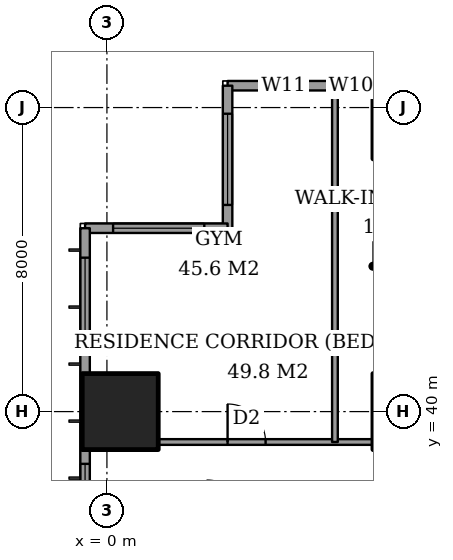
"""IFC4 building model, lengths in metres.
Left out: names, types, materials, properties, quantities, classifications, styles, units other than length and angle.
Written with IfcOpenShell. Run it as: python <this file> out.ifc"""

import sys

from ifc_helpers import new_model, si_unit, direction, frame, frame_2d, origin, origin_2d, place, context, subcontext, project, spatial, rectangle, extrude, element, fill, save


model = new_model("IFC4")
c1 = context("Model", 3, precision=1e-05, world=origin(), true_north=direction((0.0, 1.0)))
c2 = subcontext(c1, "Body", "Model", "MODEL_VIEW")
j1 = project(units=[si_unit("LENGTHUNIT", "METRE"), si_unit("PLANEANGLEUNIT", "RADIAN")], contexts=[c1])
p1 = place(None, origin())
s1 = spatial("IfcSite", under=j1, at=p1, CompositionType="ELEMENT")
p2 = place(p1, origin())
s2 = spatial("IfcBuilding", under=s1, at=p2, CompositionType="ELEMENT")
p3 = place(p2, frame((0.0, 0.0, 128.6)))
s3 = spatial("IfcBuildingStorey", under=s2, at=p3, CompositionType="ELEMENT", Elevation=128.6)
p4 = place(p3, frame((0.35, 40.0, 0.0), z_axis=(0.0, 0.0, 1.0), x_axis=(1.0, 0.0, 0.0)))
e1 = element("IfcColumn", 1, at=p4, inside=s3, PredefinedType="COLUMN", context=c2, shape_type="SweptSolid", body=[
    extrude(rectangle(XDim=2.0, YDim=2.0, at=origin_2d()), origin(), (0.0, 0.0, 1.0), 3.6),
])
p5 = place(p3, frame((24.575, 48.575, 0.0), z_axis=(0.0, 0.0, 1.0), x_axis=(-1.0, 0.0, 0.0)))
e2 = element("IfcWall", 2, at=p5, inside=s3, PredefinedType="SOLIDWALL", context=c2, shape_type="SweptSolid", body=[
    extrude(rectangle(XDim=21.4, YDim=0.25, at=frame_2d((10.7, 0.0))), origin(), (0.0, 0.0, 1.0), 3.6),
])
p6 = place(p5, frame((2.275, 0.0, 0.4)))
e3 = element("IfcOpeningElement", 3, at=p6, cuts=e2, PredefinedType="OPENING", context=c2, shape_type="SweptSolid", body=[
    extrude(rectangle(XDim=1.2, YDim=2.2, at=frame_2d((0.6, 1.1))), frame((0.0, 0.135, 0.0), z_axis=(0.0, -1.0, 0.0), x_axis=(1.0, 0.0, 0.0)), (0.0, 0.0, 1.0), 0.27),
])
p7 = place(p5, frame((4.425, 0.0, 0.4)))
e4 = element("IfcOpeningElement", 4, at=p7, cuts=e2, PredefinedType="OPENING", context=c2, shape_type="SweptSolid", body=[
    extrude(rectangle(XDim=2.4, YDim=2.2, at=frame_2d((1.2, 1.1))), frame((0.0, 0.135, 0.0), z_axis=(0.0, -1.0, 0.0), x_axis=(1.0, 0.0, 0.0)), (0.0, 0.0, 1.0), 0.27),
])
p8 = place(p5, frame((10.4, 0.0, 0.4)))
e5 = element("IfcOpeningElement", 5, at=p8, cuts=e2, PredefinedType="OPENING", context=c2, shape_type="SweptSolid", body=[
    extrude(rectangle(XDim=1.2, YDim=2.2, at=frame_2d((0.6, 1.1))), frame((0.0, 0.135, 0.0), z_axis=(0.0, -1.0, 0.0), x_axis=(1.0, 0.0, 0.0)), (0.0, 0.0, 1.0), 0.27),
])
p9 = place(p5, frame((12.475, 0.0, 0.4)))
e6 = element("IfcOpeningElement", 6, at=p9, cuts=e2, PredefinedType="OPENING", context=c2, shape_type="SweptSolid", body=[
    extrude(rectangle(XDim=2.4, YDim=2.2, at=frame_2d((1.2, 1.1))), frame((0.0, 0.135, 0.0), z_axis=(0.0, -1.0, 0.0), x_axis=(1.0, 0.0, 0.0)), (0.0, 0.0, 1.0), 0.27),
])
p10 = place(p5, frame((17.85, 0.0, 0.4)))
e7 = element("IfcOpeningElement", 7, at=p10, cuts=e2, PredefinedType="OPENING", context=c2, shape_type="SweptSolid", body=[
    extrude(rectangle(XDim=0.6, YDim=2.2, at=frame_2d((0.3, 1.1))), frame((0.0, 0.135, 0.0), z_axis=(0.0, -1.0, 0.0), x_axis=(1.0, 0.0, 0.0)), (0.0, 0.0, 1.0), 0.27),
])
p11 = place(p5, frame((19.325, 0.0, 0.4)))
e8 = element("IfcOpeningElement", 8, at=p11, cuts=e2, PredefinedType="OPENING", context=c2, shape_type="SweptSolid", body=[
    extrude(rectangle(XDim=1.2, YDim=2.2, at=frame_2d((0.6, 1.1))), frame((0.0, 0.135, 0.0), z_axis=(0.0, -1.0, 0.0), x_axis=(1.0, 0.0, 0.0)), (0.0, 0.0, 1.0), 0.27),
])
p12 = place(p3, frame((3.175, 48.575, 0.0), z_axis=(0.0, 0.0, 1.0), x_axis=(0.0, -1.0, 0.0)))
e9 = element("IfcWall", 9, at=p12, inside=s3, PredefinedType="SOLIDWALL", context=c2, shape_type="SweptSolid", body=[
    extrude(rectangle(XDim=3.75, YDim=0.25, at=frame_2d((1.875, 0.0))), origin(), (0.0, 0.0, 1.0), 3.6),
])
p13 = place(p12, frame((0.738, 0.0, 0.4)))
e10 = element("IfcOpeningElement", 10, at=p13, cuts=e9, PredefinedType="OPENING", context=c2, shape_type="SweptSolid", body=[
    extrude(rectangle(XDim=2.4, YDim=2.2, at=frame_2d((1.2, 1.1))), frame((0.0, 0.135, 0.0), z_axis=(0.0, -1.0, 0.0), x_axis=(1.0, 0.0, 0.0)), (0.0, 0.0, 1.0), 0.27),
])
p14 = place(p3, frame((3.175, 44.825, 0.0), z_axis=(0.0, 0.0, 1.0), x_axis=(-1.0, 0.0, 0.0)))
e11 = element("IfcWall", 11, at=p14, inside=s3, PredefinedType="SOLIDWALL", context=c2, shape_type="SweptSolid", body=[
    extrude(rectangle(XDim=3.75, YDim=0.25, at=frame_2d((1.875, 0.0))), origin(), (0.0, 0.0, 1.0), 3.6),
])
p15 = place(p14, frame((0.613, 0.0, 0.4)))
e12 = element("IfcOpeningElement", 12, at=p15, cuts=e11, PredefinedType="OPENING", context=c2, shape_type="SweptSolid", body=[
    extrude(rectangle(XDim=2.4, YDim=2.2, at=frame_2d((1.2, 1.1))), frame((0.0, 0.135, 0.0), z_axis=(0.0, -1.0, 0.0), x_axis=(1.0, 0.0, 0.0)), (0.0, 0.0, 1.0), 0.27),
])
p16 = place(p3, frame((-0.575, 44.825, 0.0), z_axis=(0.0, 0.0, 1.0), x_axis=(0.0, -1.0, 0.0)))
e13 = element("IfcWall", 13, at=p16, inside=s3, PredefinedType="SOLIDWALL", context=c2, shape_type="SweptSolid", body=[
    extrude(rectangle(XDim=41.65, YDim=0.25, at=frame_2d((20.825, 0.0))), origin(), (0.0, 0.0, 1.0), 3.6),
])
p17 = place(p16, frame((0.775, 0.0, 0.4)))
e14 = element("IfcOpeningElement", 14, at=p17, cuts=e13, PredefinedType="OPENING", context=c2, shape_type="SweptSolid", body=[
    extrude(rectangle(XDim=2.4, YDim=2.2, at=frame_2d((1.2, 1.1))), frame((0.0, 0.135, 0.0), z_axis=(0.0, -1.0, 0.0), x_axis=(1.0, 0.0, 0.0)), (0.0, 0.0, 1.0), 0.27),
])
p18 = place(p16, frame((6.2, 0.0, 0.4)))
e15 = element("IfcOpeningElement", 15, at=p18, cuts=e13, PredefinedType="OPENING", context=c2, shape_type="SweptSolid", body=[
    extrude(rectangle(XDim=1.2, YDim=2.2, at=frame_2d((0.6, 1.1))), frame((0.0, 0.135, 0.0), z_axis=(0.0, -1.0, 0.0), x_axis=(1.0, 0.0, 0.0)), (0.0, 0.0, 1.0), 0.27),
])
p19 = place(p16, frame((8.525, 0.0, 0.4)))
e16 = element("IfcOpeningElement", 16, at=p19, cuts=e13, PredefinedType="OPENING", context=c2, shape_type="SweptSolid", body=[
    extrude(rectangle(XDim=2.4, YDim=2.2, at=frame_2d((1.2, 1.1))), frame((0.0, 0.135, 0.0), z_axis=(0.0, -1.0, 0.0), x_axis=(1.0, 0.0, 0.0)), (0.0, 0.0, 1.0), 0.27),
])
p20 = place(p16, frame((15.625, 0.0, 0.4)))
e17 = element("IfcOpeningElement", 17, at=p20, cuts=e13, PredefinedType="OPENING", context=c2, shape_type="SweptSolid", body=[
    extrude(rectangle(XDim=2.4, YDim=2.2, at=frame_2d((1.2, 1.1))), frame((0.0, 0.135, 0.0), z_axis=(0.0, -1.0, 0.0), x_axis=(1.0, 0.0, 0.0)), (0.0, 0.0, 1.0), 0.27),
])
p21 = place(p16, frame((23.625, 0.0, 0.4)))
e18 = element("IfcOpeningElement", 18, at=p21, cuts=e13, PredefinedType="OPENING", context=c2, shape_type="SweptSolid", body=[
    extrude(rectangle(XDim=2.4, YDim=2.2, at=frame_2d((1.2, 1.1))), frame((0.0, 0.135, 0.0), z_axis=(0.0, -1.0, 0.0), x_axis=(1.0, 0.0, 0.0)), (0.0, 0.0, 1.0), 0.27),
])
p22 = place(p16, frame((30.825, 0.0, 0.4)))
e19 = element("IfcOpeningElement", 19, at=p22, cuts=e13, PredefinedType="OPENING", context=c2, shape_type="SweptSolid", body=[
    extrude(rectangle(XDim=2.4, YDim=2.2, at=frame_2d((1.2, 1.1))), frame((0.0, 0.135, 0.0), z_axis=(0.0, -1.0, 0.0), x_axis=(1.0, 0.0, 0.0)), (0.0, 0.0, 1.0), 0.27),
])
p23 = place(p16, frame((34.5, 0.0, 0.4)))
e20 = element("IfcOpeningElement", 20, at=p23, cuts=e13, PredefinedType="OPENING", context=c2, shape_type="SweptSolid", body=[
    extrude(rectangle(XDim=1.2, YDim=2.2, at=frame_2d((0.6, 1.1))), frame((0.0, 0.135, 0.0), z_axis=(0.0, -1.0, 0.0), x_axis=(1.0, 0.0, 0.0)), (0.0, 0.0, 1.0), 0.27),
])
p24 = place(p16, frame((38.475, 0.0, 0.4)))
e21 = element("IfcOpeningElement", 21, at=p24, cuts=e13, PredefinedType="OPENING", context=c2, shape_type="SweptSolid", body=[
    extrude(rectangle(XDim=2.4, YDim=2.2, at=frame_2d((1.2, 1.1))), frame((0.0, 0.135, 0.0), z_axis=(0.0, -1.0, 0.0), x_axis=(1.0, 0.0, 0.0)), (0.0, 0.0, 1.0), 0.27),
])
p25 = place(p3, frame((1.35, 39.2, 0.0), z_axis=(0.0, 0.0, 1.0), x_axis=(1.0, 0.0, 0.0)))
e22 = element("IfcWall", 22, at=p25, inside=s3, PredefinedType="PARTITIONING", context=c2, shape_type="SweptSolid", body=[
    extrude(rectangle(XDim=5.65, YDim=0.15, at=frame_2d((2.825, 0.0))), origin(), (0.0, 0.0, 1.0), 3.35),
])
p26 = place(p25, frame((1.825, 0.0, 0.0)))
e23 = element("IfcOpeningElement", 23, at=p26, cuts=e22, PredefinedType="OPENING", context=c2, shape_type="SweptSolid", body=[
    extrude(rectangle(XDim=1.0, YDim=2.1, at=frame_2d((0.5, 1.05))), frame((0.0, 0.085, 0.0), z_axis=(0.0, -1.0, 0.0), x_axis=(1.0, 0.0, 0.0)), (0.0, 0.0, 1.0), 0.17),
])
p27 = place(p3, frame((6.0, 39.2, 0.0), z_axis=(0.0, 0.0, 1.0), x_axis=(0.0, 1.0, 0.0)))
e24 = element("IfcWall", 24, at=p27, inside=s3, PredefinedType="PARTITIONING", context=c2, shape_type="SweptSolid", body=[
    extrude(rectangle(XDim=9.25, YDim=0.15, at=frame_2d((4.625, 0.0))), origin(), (0.0, 0.0, 1.0), 3.35),
])
p28 = place(p10, origin())
e25 = element("IfcWindow", 25, at=p28, inside=s3, PartitioningType="SINGLE_PANEL", PredefinedType="WINDOW", context=c2, shape_type="SweptSolid", body=[
    extrude(rectangle(XDim=0.6, YDim=2.2, at=frame_2d((0.3, 1.1))), frame((0.0, 0.03, 0.0), z_axis=(0.0, -1.0, 0.0), x_axis=(1.0, 0.0, 0.0)), (0.0, 0.0, 1.0), 0.06),
])
fill(e7, e25)
p29 = place(p11, origin())
e26 = element("IfcWindow", 26, at=p29, inside=s3, PartitioningType="SINGLE_PANEL", PredefinedType="WINDOW", context=c2, shape_type="SweptSolid", body=[
    extrude(rectangle(XDim=1.2, YDim=2.2, at=frame_2d((0.6, 1.1))), frame((0.0, 0.03, 0.0), z_axis=(0.0, -1.0, 0.0), x_axis=(1.0, 0.0, 0.0)), (0.0, 0.0, 1.0), 0.06),
])
fill(e8, e26)
p30 = place(p13, origin())
e27 = element("IfcWindow", 27, at=p30, inside=s3, PartitioningType="SINGLE_PANEL", PredefinedType="WINDOW", context=c2, shape_type="SweptSolid", body=[
    extrude(rectangle(XDim=2.4, YDim=2.2, at=frame_2d((1.2, 1.1))), frame((0.0, 0.03, 0.0), z_axis=(0.0, -1.0, 0.0), x_axis=(1.0, 0.0, 0.0)), (0.0, 0.0, 1.0), 0.06),
])
fill(e10, e27)
p31 = place(p15, origin())
e28 = element("IfcWindow", 28, at=p31, inside=s3, PartitioningType="SINGLE_PANEL", PredefinedType="WINDOW", context=c2, shape_type="SweptSolid", body=[
    extrude(rectangle(XDim=2.4, YDim=2.2, at=frame_2d((1.2, 1.1))), frame((0.0, 0.03, 0.0), z_axis=(0.0, -1.0, 0.0), x_axis=(1.0, 0.0, 0.0)), (0.0, 0.0, 1.0), 0.06),
])
fill(e12, e28)
p32 = place(p17, origin())
e29 = element("IfcWindow", 29, at=p32, inside=s3, PartitioningType="SINGLE_PANEL", PredefinedType="WINDOW", context=c2, shape_type="SweptSolid", body=[
    extrude(rectangle(XDim=2.4, YDim=2.2, at=frame_2d((1.2, 1.1))), frame((0.0, 0.03, 0.0), z_axis=(0.0, -1.0, 0.0), x_axis=(1.0, 0.0, 0.0)), (0.0, 0.0, 1.0), 0.06),
])
fill(e14, e29)
p33 = place(p18, origin())
e30 = element("IfcWindow", 30, at=p33, inside=s3, PartitioningType="SINGLE_PANEL", PredefinedType="WINDOW", context=c2, shape_type="SweptSolid", body=[
    extrude(rectangle(XDim=1.2, YDim=2.2, at=frame_2d((0.6, 1.1))), frame((0.0, 0.03, 0.0), z_axis=(0.0, -1.0, 0.0), x_axis=(1.0, 0.0, 0.0)), (0.0, 0.0, 1.0), 0.06),
])
fill(e15, e30)
p34 = place(p26, origin())
e31 = element("IfcDoor", 31, at=p34, inside=s3, OperationType="SINGLE_SWING_RIGHT", PredefinedType="DOOR", context=c2, shape_type="SweptSolid", body=[
    extrude(rectangle(XDim=1.0, YDim=2.1, at=frame_2d((0.5, 1.05))), frame((0.0, 0.025, 0.0), z_axis=(0.0, -1.0, 0.0), x_axis=(1.0, 0.0, 0.0)), (0.0, 0.0, 1.0), 0.05),
])
fill(e23, e31)
save(model, sys.argv[1])
